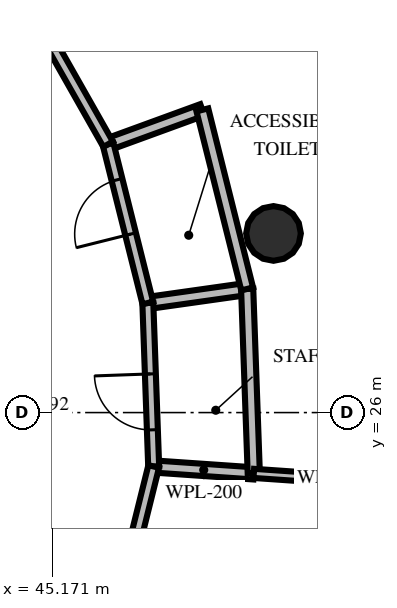
"""IFC4 building model, lengths in metres.
Left out: names, types, materials, properties, quantities, classifications, styles, units other than length and angle.
Written with IfcOpenShell. Run it as: python <this file> out.ifc"""

import sys

from ifc_helpers import new_model, si_unit, direction, frame, frame_2d, origin, origin_2d, place, context, subcontext, project, spatial, rectangle, circle, extrude, element, fill, save


model = new_model("IFC4")
c1 = context("Model", 3, precision=1e-05, world=origin(), true_north=direction((0.0, 1.0)))
c2 = subcontext(c1, "Body", "Model", "MODEL_VIEW")
j1 = project(units=[si_unit("LENGTHUNIT", "METRE"), si_unit("PLANEANGLEUNIT", "RADIAN")], contexts=[c1])
p1 = place(None, origin())
s1 = spatial("IfcSite", under=j1, at=p1, CompositionType="ELEMENT")
p2 = place(p1, origin())
s2 = spatial("IfcBuilding", under=s1, at=p2, CompositionType="ELEMENT")
p3 = place(p2, frame((0.0, 0.0, 262.8)))
s3 = spatial("IfcBuildingStorey", under=s2, at=p3, CompositionType="ELEMENT", Elevation=262.8)
p4 = place(p3, frame((48.81, 28.946, 0.0), z_axis=(0.0, 0.0, 1.0), x_axis=(1.0, 0.0, 0.0)))
e1 = element("IfcColumn", 1, at=p4, inside=s3, PredefinedType="COLUMN", context=c2, shape_type="SweptSolid", body=[
    extrude(circle(Radius=0.45, at=origin_2d()), origin(), (0.0, 0.0, 1.0), 3.6),
])
p5 = place(p3, frame((49.189, 20.17, 0.0), z_axis=(0.0, 0.0, 1.0), x_axis=(0.314951068445, 0.949107909821, 0.0)))
e2 = element("IfcWall", 2, at=p5, inside=s3, PredefinedType="SOLIDWALL", context=c2, shape_type="SweptSolid", body=[
    extrude(rectangle(XDim=7.115, YDim=0.3, at=frame_2d((3.558, 0.0))), origin(), (0.0, 0.0, 1.0), 2.76),
])
p6 = place(p5, frame((2.508, 0.0, 0.8)))
e3 = element("IfcOpeningElement", 3, at=p6, cuts=e2, PredefinedType="OPENING", context=c2, shape_type="SweptSolid", body=[
    extrude(rectangle(XDim=2.1, YDim=1.85, at=frame_2d((1.05, 0.925))), frame((0.0, 0.16, 0.0), z_axis=(0.0, -1.0, 0.0), x_axis=(1.0, 0.0, 0.0)), (0.0, 0.0, 1.0), 0.32),
])
for number, where, z_axis, x_axis in (
    (4, (46.839, 25.113, 0.0), (0.0, 0.0, 1.0), (0.998, -0.069, 0.0)),
    (5, (46.743, 27.802, 0.0), (0.0, 0.0, 1.0), (0.99, 0.14, 0.0)),
):
    element("IfcWall", number, at=place(p3, frame(where, z_axis=z_axis, x_axis=x_axis)), inside=s3, PredefinedType="PLUMBINGWALL", context=c2, shape_type="SweptSolid", body=[
        extrude(rectangle(XDim=1.65, YDim=0.2, at=frame_2d((0.825, 0.0))), origin(), (0.0, 0.0, 1.0), 2.46),
    ])
p7 = place(p3, frame((48.486, 25.0, 0.0), z_axis=(0.0, 0.0, 1.0), x_axis=(-0.035791941418, 0.999359263193, 0.0)))
e6 = element("IfcWall", 6, at=p7, inside=s3, PredefinedType="PLUMBINGWALL", context=c2, shape_type="SweptSolid", body=[
    extrude(rectangle(XDim=3.035, YDim=0.2, at=frame_2d((1.518, 0.0))), origin(), (0.0, 0.0, 1.0), 2.46),
])
p8 = place(p3, frame((46.839, 25.113, 0.0), z_axis=(0.0, 0.0, 1.0), x_axis=(-0.035749786109, 0.99936077209, 0.0)))
e7 = element("IfcWall", 7, at=p8, inside=s3, PredefinedType="PARTITIONING", context=c2, shape_type="SweptSolid", body=[
    extrude(rectangle(XDim=2.691, YDim=0.18, at=frame_2d((1.345, 0.0))), origin(), (0.0, 0.0, 1.0), 2.46),
])
p9 = place(p8, frame((0.603, 0.0, 0.0)))
e8 = element("IfcOpeningElement", 8, at=p9, cuts=e7, PredefinedType="OPENING", context=c2, shape_type="SweptSolid", body=[
    extrude(rectangle(XDim=0.92, YDim=2.1, at=frame_2d((0.46, 1.05))), frame((0.0, 0.1, 0.0), z_axis=(0.0, -1.0, 0.0), x_axis=(1.0, 0.0, 0.0)), (0.0, 0.0, 1.0), 0.2),
])
p10 = place(p3, frame((46.09, 30.412, 0.0), z_axis=(0.0, 0.0, 1.0), x_axis=(0.939382287861, 0.342871575453, 0.0)))
e9 = element("IfcWall", 9, at=p10, inside=s3, PredefinedType="PLUMBINGWALL", context=c2, shape_type="SweptSolid", body=[
    extrude(rectangle(XDim=1.65, YDim=0.2, at=frame_2d((0.825, 0.0))), origin(), (0.0, 0.0, 1.0), 2.46),
])
p11 = place(p3, frame((48.377, 28.033, 0.0), z_axis=(0.0, 0.0, 1.0), x_axis=(-0.242800542642, 0.97007623231, 0.0)))
e10 = element("IfcWall", 10, at=p11, inside=s3, PredefinedType="PLUMBINGWALL", context=c2, shape_type="SweptSolid", body=[
    extrude(rectangle(XDim=3.036, YDim=0.2, at=frame_2d((1.518, 0.0))), origin(), (0.0, 0.0, 1.0), 2.46),
])
p12 = place(p3, frame((46.743, 27.802, 0.0), z_axis=(0.0, 0.0, 1.0), x_axis=(-0.242727774207, 0.970094442634, 0.0)))
e11 = element("IfcWall", 11, at=p12, inside=s3, PredefinedType="PARTITIONING", context=c2, shape_type="SweptSolid", body=[
    extrude(rectangle(XDim=2.691, YDim=0.18, at=frame_2d((1.345, 0.0))), origin(), (0.0, 0.0, 1.0), 2.46),
])
p13 = place(p12, frame((1.167, 0.0, 0.0)))
e12 = element("IfcOpeningElement", 12, at=p13, cuts=e11, PredefinedType="OPENING", context=c2, shape_type="SweptSolid", body=[
    extrude(rectangle(XDim=0.92, YDim=2.1, at=frame_2d((0.46, 1.05))), frame((0.0, 0.1, 0.0), z_axis=(0.0, -1.0, 0.0), x_axis=(1.0, 0.0, 0.0)), (0.0, 0.0, 1.0), 0.2),
])
p14 = place(p3, frame((48.486, 25.0, 0.0), z_axis=(0.0, 0.0, 1.0), x_axis=(0.99762916315, -0.068818985991, 0.0)))
e13 = element("IfcWall", 13, at=p14, inside=s3, PredefinedType="PARTITIONING", context=c2, shape_type="SweptSolid", body=[
    extrude(rectangle(XDim=2.48, YDim=0.15, at=frame_2d((1.24, 0.0))), origin(), (0.0, 0.0, 1.0), 2.46),
])
p15 = place(p3, frame((46.09, 30.412, 0.0), z_axis=(0.0, 0.0, 1.0), x_axis=(-0.493177857929, 0.869928503067, 0.0)))
e14 = element("IfcWall", 14, at=p15, inside=s3, PredefinedType="PARTITIONING", context=c2, shape_type="SweptSolid", body=[
    extrude(rectangle(XDim=4.248, YDim=0.18, at=frame_2d((2.124, 0.0))), origin(), (0.0, 0.0, 1.0), 2.46),
])
p16 = place(p3, frame((45.762, 20.776, 0.0), z_axis=(0.0, 0.0, 1.0), x_axis=(0.241057272798, 0.970510891866, 0.0)))
e15 = element("IfcWall", 15, at=p16, inside=s3, PredefinedType="PARTITIONING", context=c2, shape_type="SweptSolid", body=[
    extrude(rectangle(XDim=4.469, YDim=0.18, at=frame_2d((2.235, 0.0))), origin(), (0.0, 0.0, 1.0), 2.46),
])
p17 = place(p16, frame((0.942, 0.0, 0.0)))
e16 = element("IfcOpeningElement", 16, at=p17, cuts=e15, PredefinedType="OPENING", context=c2, shape_type="SweptSolid", body=[
    extrude(rectangle(XDim=1.0, YDim=2.15, at=frame_2d((0.5, 1.075))), frame((0.0, 0.1, 0.0), z_axis=(0.0, -1.0, 0.0), x_axis=(1.0, 0.0, 0.0)), (0.0, 0.0, 1.0), 0.2),
])
p18 = place(p9, origin())
e17 = element("IfcDoor", 17, at=p18, inside=s3, OperationType="SINGLE_SWING_RIGHT", PredefinedType="DOOR", context=c2, shape_type="SweptSolid", body=[
    extrude(rectangle(XDim=0.92, YDim=2.1, at=frame_2d((0.46, 1.05))), frame((0.0, 0.025, 0.0), z_axis=(0.0, -1.0, 0.0), x_axis=(1.0, 0.0, 0.0)), (0.0, 0.0, 1.0), 0.05),
])
fill(e8, e17)
p19 = place(p13, origin())
e18 = element("IfcDoor", 18, at=p19, inside=s3, OperationType="SINGLE_SWING_LEFT", PredefinedType="DOOR", context=c2, shape_type="SweptSolid", body=[
    extrude(rectangle(XDim=0.92, YDim=2.1, at=frame_2d((0.46, 1.05))), frame((0.0, 0.025, 0.0), z_axis=(0.0, -1.0, 0.0), x_axis=(1.0, 0.0, 0.0)), (0.0, 0.0, 1.0), 0.05),
])
fill(e12, e18)
save(model, sys.argv[1])
